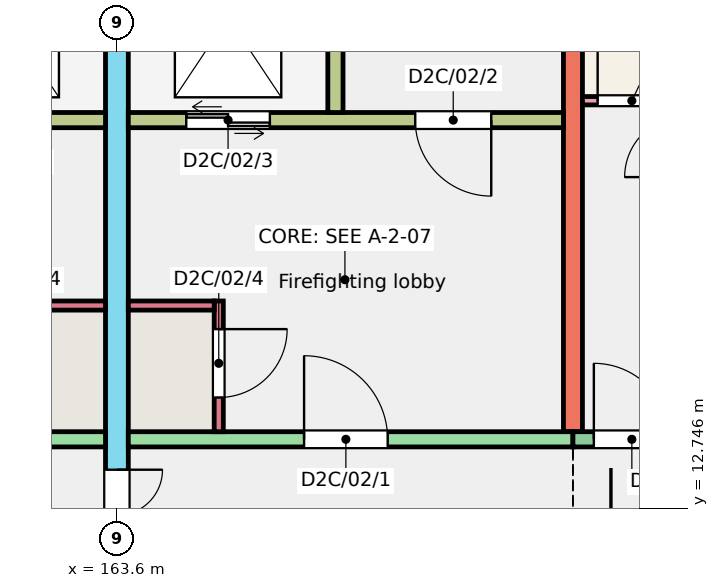
"""IFC4 building model, lengths in metres.
Left out: names, types, materials, properties, quantities, classifications, styles, units other than length and angle.
Written with IfcOpenShell. Run it as: python <this file> out.ifc"""

import sys

from ifc_helpers import new_model, si_unit, direction, frame, frame_2d, origin, place, context, subcontext, project, spatial, rectangle, extrude, element, fill, save


model = new_model("IFC4")
c1 = context("Model", 3, precision=1e-05, world=origin(), true_north=direction((0.0, 1.0)))
c2 = subcontext(c1, "Body", "Model", "MODEL_VIEW")
j1 = project(units=[si_unit("LENGTHUNIT", "METRE"), si_unit("PLANEANGLEUNIT", "RADIAN")], contexts=[c1])
p1 = place(None, origin())
s1 = spatial("IfcSite", under=j1, at=p1, CompositionType="ELEMENT")
p2 = place(p1, origin())
s2 = spatial("IfcBuilding", under=s1, at=p2, CompositionType="ELEMENT")
p3 = place(p2, frame((0.0, 0.0, 6.0)))
s3 = spatial("IfcBuildingStorey", under=s2, at=p3, CompositionType="ELEMENT", Elevation=6.0)
p4 = place(p3, frame((163.6, 11.75, 0.0), z_axis=(0.0, 0.0, 1.0), x_axis=(0.0, 1.0, 0.0)))
e1 = element("IfcWall", 1, at=p4, inside=s3, PredefinedType="SHEAR", context=c2, shape_type="SweptSolid", body=[
    extrude(rectangle(XDim=11.0, YDim=0.3, at=frame_2d((5.5, 0.0))), origin(), (0.0, 0.0, 1.0), 3.0),
])
p5 = place(p4, frame((0.3, 0.0, 0.0)))
e2 = element("IfcOpeningElement", 2, at=p5, cuts=e1, PredefinedType="OPENING", context=c2, shape_type="SweptSolid", body=[
    extrude(rectangle(XDim=1.2, YDim=2.1, at=frame_2d((0.6, 1.05))), frame((0.0, 0.16, 0.0), z_axis=(0.0, -1.0, 0.0), x_axis=(1.0, 0.0, 0.0)), (0.0, 0.0, 1.0), 0.32),
])
p6 = place(p3, frame((169.6, 13.75, 0.0), z_axis=(0.0, 0.0, 1.0), x_axis=(0.0, 1.0, 0.0)))
e3 = element("IfcWall", 3, at=p6, inside=s3, PredefinedType="SHEAR", context=c2, shape_type="SweptSolid", body=[
    extrude(rectangle(XDim=9.0, YDim=0.25, at=frame_2d((4.5, 0.0))), origin(), (0.0, 0.0, 1.0), 3.0),
])
p7 = place(p3, frame((157.6, 13.65, 0.0), z_axis=(0.0, 0.0, 1.0), x_axis=(1.0, 0.0, 0.0)))
e4 = element("IfcWall", 4, at=p7, inside=s3, PredefinedType="SHEAR", context=c2, shape_type="SweptSolid", body=[
    extrude(rectangle(XDim=5.85, YDim=0.2, at=frame_2d((2.925, 0.0))), origin(), (0.0, 0.0, 1.0), 3.0),
])
p8 = place(p7, frame((2.438, 0.0, 0.0)))
e5 = element("IfcOpeningElement", 5, at=p8, cuts=e4, PredefinedType="OPENING", context=c2, shape_type="SweptSolid", body=[
    extrude(rectangle(XDim=1.1, YDim=2.1, at=frame_2d((0.55, 1.05))), frame((0.0, 0.11, 0.0), z_axis=(0.0, -1.0, 0.0), x_axis=(1.0, 0.0, 0.0)), (0.0, 0.0, 1.0), 0.22),
])
p9 = place(p3, frame((157.725, 17.85, 0.0), z_axis=(0.0, 0.0, 1.0), x_axis=(1.0, 0.0, 0.0)))
e6 = element("IfcWall", 6, at=p9, inside=s3, PredefinedType="SHEAR", context=c2, shape_type="SweptSolid", body=[
    extrude(rectangle(XDim=5.725, YDim=0.2, at=frame_2d((2.862, 0.0))), origin(), (0.0, 0.0, 1.0), 3.0),
])
p10 = place(p9, frame((0.95, 0.0, 0.0)))
e7 = element("IfcOpeningElement", 7, at=p10, cuts=e6, PredefinedType="OPENING", context=c2, shape_type="SweptSolid", body=[
    extrude(rectangle(XDim=1.0, YDim=2.1, at=frame_2d((0.5, 1.05))), frame((0.0, 0.11, 0.0), z_axis=(0.0, -1.0, 0.0), x_axis=(1.0, 0.0, 0.0)), (0.0, 0.0, 1.0), 0.22),
])
p11 = place(p9, frame((3.863, 0.0, 0.0)))
e8 = element("IfcOpeningElement", 8, at=p11, cuts=e6, PredefinedType="OPENING", context=c2, shape_type="SweptSolid", body=[
    extrude(rectangle(XDim=1.1, YDim=2.1, at=frame_2d((0.55, 1.05))), frame((0.0, 0.11, 0.0), z_axis=(0.0, -1.0, 0.0), x_axis=(1.0, 0.0, 0.0)), (0.0, 0.0, 1.0), 0.22),
])
p12 = place(p3, frame((162.32, 15.41, 0.0), z_axis=(0.0, 0.0, 1.0), x_axis=(1.0, 0.0, 0.0)))
e9 = element("IfcWall", 9, at=p12, inside=s3, PredefinedType="SHEAR", context=c2, shape_type="SweptSolid", body=[
    extrude(rectangle(XDim=1.13, YDim=0.12, at=frame_2d((0.565, 0.0))), origin(), (0.0, 0.0, 1.0), 3.0),
])
p13 = place(p3, frame((163.75, 13.65, 0.0), z_axis=(0.0, 0.0, 1.0), x_axis=(1.0, 0.0, 0.0)))
e10 = element("IfcWall", 10, at=p13, inside=s3, PredefinedType="SHEAR", context=c2, shape_type="SweptSolid", body=[
    extrude(rectangle(XDim=5.85, YDim=0.2, at=frame_2d((2.925, 0.0))), origin(), (0.0, 0.0, 1.0), 3.0),
])
p14 = place(p13, frame((2.312, 0.0, 0.0)))
e11 = element("IfcOpeningElement", 11, at=p14, cuts=e10, PredefinedType="OPENING", context=c2, shape_type="SweptSolid", body=[
    extrude(rectangle(XDim=1.1, YDim=2.1, at=frame_2d((0.55, 1.05))), frame((0.0, 0.11, 0.0), z_axis=(0.0, -1.0, 0.0), x_axis=(1.0, 0.0, 0.0)), (0.0, 0.0, 1.0), 0.22),
])
p15 = place(p3, frame((163.75, 17.85, 0.0), z_axis=(0.0, 0.0, 1.0), x_axis=(1.0, 0.0, 0.0)))
e12 = element("IfcWall", 12, at=p15, inside=s3, PredefinedType="SHEAR", context=c2, shape_type="SweptSolid", body=[
    extrude(rectangle(XDim=5.725, YDim=0.2, at=frame_2d((2.863, 0.0))), origin(), (0.0, 0.0, 1.0), 3.0),
])
p16 = place(p15, frame((3.775, 0.0, 0.0)))
e13 = element("IfcOpeningElement", 13, at=p16, cuts=e12, PredefinedType="OPENING", context=c2, shape_type="SweptSolid", body=[
    extrude(rectangle(XDim=1.0, YDim=2.1, at=frame_2d((0.5, 1.05))), frame((0.0, 0.11, 0.0), z_axis=(0.0, -1.0, 0.0), x_axis=(1.0, 0.0, 0.0)), (0.0, 0.0, 1.0), 0.22),
])
p17 = place(p15, frame((0.762, 0.0, 0.0)))
e14 = element("IfcOpeningElement", 14, at=p17, cuts=e12, PredefinedType="OPENING", context=c2, shape_type="SweptSolid", body=[
    extrude(rectangle(XDim=1.1, YDim=2.1, at=frame_2d((0.55, 1.05))), frame((0.0, 0.11, 0.0), z_axis=(0.0, -1.0, 0.0), x_axis=(1.0, 0.0, 0.0)), (0.0, 0.0, 1.0), 0.22),
])
p18 = place(p3, frame((166.475, 17.95, 0.0), z_axis=(0.0, 0.0, 1.0), x_axis=(0.0, 1.0, 0.0)))
e15 = element("IfcWall", 15, at=p18, inside=s3, PredefinedType="SHEAR", context=c2, shape_type="SweptSolid", body=[
    extrude(rectangle(XDim=4.8, YDim=0.2, at=frame_2d((2.4, 0.0))), origin(), (0.0, 0.0, 1.0), 3.0),
])
p19 = place(p3, frame((164.94, 13.75, 0.0), z_axis=(0.0, 0.0, 1.0), x_axis=(0.0, 1.0, 0.0)))
e16 = element("IfcWall", 16, at=p19, inside=s3, PredefinedType="SHEAR", context=c2, shape_type="SweptSolid", body=[
    extrude(rectangle(XDim=1.72, YDim=0.12, at=frame_2d((0.86, 0.0))), origin(), (0.0, 0.0, 1.0), 3.0),
])
p20 = place(p19, frame((0.45, 0.0, 0.0)))
e17 = element("IfcOpeningElement", 17, at=p20, cuts=e16, PredefinedType="OPENING", context=c2, shape_type="SweptSolid", body=[
    extrude(rectangle(XDim=0.9, YDim=2.1, at=frame_2d((0.45, 1.05))), frame((0.0, 0.07, 0.0), z_axis=(0.0, -1.0, 0.0), x_axis=(1.0, 0.0, 0.0)), (0.0, 0.0, 1.0), 0.14),
])
p21 = place(p3, frame((163.75, 15.41, 0.0), z_axis=(0.0, 0.0, 1.0), x_axis=(1.0, 0.0, 0.0)))
e18 = element("IfcWall", 18, at=p21, inside=s3, PredefinedType="SHEAR", context=c2, shape_type="SweptSolid", body=[
    extrude(rectangle(XDim=1.13, YDim=0.12, at=frame_2d((0.565, 0.0))), origin(), (0.0, 0.0, 1.0), 3.0),
])
p22 = place(p3, frame((169.6, 13.65, 0.0), z_axis=(0.0, 0.0, 1.0), x_axis=(1.0, 0.0, 0.0)))
e19 = element("IfcWall", 19, at=p22, inside=s3, PredefinedType="SOLIDWALL", context=c2, shape_type="SweptSolid", body=[
    extrude(rectangle(XDim=3.6, YDim=0.2, at=frame_2d((1.8, 0.0))), origin(), (0.0, 0.0, 1.0), 3.0),
])
p23 = place(p22, frame((1.905, 0.0, 1.1)))
e20 = element("IfcOpeningElement", 20, at=p23, cuts=e19, PredefinedType="OPENING", context=c2, shape_type="SweptSolid", body=[
    extrude(rectangle(XDim=1.2, YDim=1.3, at=frame_2d((0.6, 0.65))), frame((0.0, 0.11, 0.0), z_axis=(0.0, -1.0, 0.0), x_axis=(1.0, 0.0, 0.0)), (0.0, 0.0, 1.0), 0.22),
])
p24 = place(p22, frame((0.275, 0.0, 0.0)))
e21 = element("IfcOpeningElement", 21, at=p24, cuts=e19, PredefinedType="OPENING", context=c2, shape_type="SweptSolid", body=[
    extrude(rectangle(XDim=1.0, YDim=2.1, at=frame_2d((0.5, 1.05))), frame((0.0, 0.11, 0.0), z_axis=(0.0, -1.0, 0.0), x_axis=(1.0, 0.0, 0.0)), (0.0, 0.0, 1.0), 0.22),
])
p25 = place(p3, frame((169.725, 18.105, 0.0), z_axis=(0.0, 0.0, 1.0), x_axis=(1.0, 0.0, 0.0)))
e22 = element("IfcWall", 22, at=p25, inside=s3, PredefinedType="PARTITIONING", context=c2, shape_type="SweptSolid", body=[
    extrude(rectangle(XDim=3.35, YDim=0.11, at=frame_2d((1.675, 0.0))), origin(), (0.0, 0.0, 1.0), 2.8),
])
p26 = place(p25, frame((0.2, 0.0, 0.0)))
e23 = element("IfcOpeningElement", 23, at=p26, cuts=e22, PredefinedType="OPENING", context=c2, shape_type="SweptSolid", body=[
    extrude(rectangle(XDim=0.9, YDim=2.1, at=frame_2d((0.45, 1.05))), frame((0.0, 0.065, 0.0), z_axis=(0.0, -1.0, 0.0), x_axis=(1.0, 0.0, 0.0)), (0.0, 0.0, 1.0), 0.13),
])
p27 = place(p24, origin())
e24 = element("IfcDoor", 24, at=p27, inside=s3, OperationType="SINGLE_SWING_LEFT", PredefinedType="DOOR", context=c2, shape_type="SweptSolid", body=[
    extrude(rectangle(XDim=1.0, YDim=2.1, at=frame_2d((0.5, 1.05))), frame((0.0, 0.025, 0.0), z_axis=(0.0, -1.0, 0.0), x_axis=(1.0, 0.0, 0.0)), (0.0, 0.0, 1.0), 0.05),
])
fill(e21, e24)
p28 = place(p26, origin())
e25 = element("IfcDoor", 25, at=p28, inside=s3, OperationType="SINGLE_SWING_LEFT", PredefinedType="DOOR", context=c2, shape_type="SweptSolid", body=[
    extrude(rectangle(XDim=0.9, YDim=2.1, at=frame_2d((0.45, 1.05))), frame((0.0, 0.025, 0.0), z_axis=(0.0, -1.0, 0.0), x_axis=(1.0, 0.0, 0.0)), (0.0, 0.0, 1.0), 0.05),
])
fill(e23, e25)
p29 = place(p14, origin())
e26 = element("IfcDoor", 26, at=p29, inside=s3, OperationType="SINGLE_SWING_LEFT", PredefinedType="DOOR", context=c2, shape_type="SweptSolid", body=[
    extrude(rectangle(XDim=1.1, YDim=2.1, at=frame_2d((0.55, 1.05))), frame((0.0, 0.025, 0.0), z_axis=(0.0, -1.0, 0.0), x_axis=(1.0, 0.0, 0.0)), (0.0, 0.0, 1.0), 0.05),
])
fill(e11, e26)
p30 = place(p16, origin())
e27 = element("IfcDoor", 27, at=p30, inside=s3, OperationType="SINGLE_SWING_RIGHT", PredefinedType="DOOR", context=c2, shape_type="SweptSolid", body=[
    extrude(rectangle(XDim=1.0, YDim=2.1, at=frame_2d((0.5, 1.05))), frame((0.0, 0.025, 0.0), z_axis=(0.0, -1.0, 0.0), x_axis=(1.0, 0.0, 0.0)), (0.0, 0.0, 1.0), 0.05),
])
fill(e13, e27)
p31 = place(p17, origin())
e28 = element("IfcDoor", 28, at=p31, inside=s3, OperationType="DOUBLE_DOOR_SLIDING", PredefinedType="DOOR", context=c2, shape_type="SweptSolid", body=[
    extrude(rectangle(XDim=1.1, YDim=2.1, at=frame_2d((0.55, 1.05))), frame((0.0, 0.025, 0.0), z_axis=(0.0, -1.0, 0.0), x_axis=(1.0, 0.0, 0.0)), (0.0, 0.0, 1.0), 0.05),
])
fill(e14, e28)
p32 = place(p20, origin())
e29 = element("IfcDoor", 29, at=p32, inside=s3, OperationType="SINGLE_SWING_RIGHT", PredefinedType="DOOR", context=c2, shape_type="SweptSolid", body=[
    extrude(rectangle(XDim=0.9, YDim=2.1, at=frame_2d((0.45, 1.05))), frame((0.0, 0.025, 0.0), z_axis=(0.0, -1.0, 0.0), x_axis=(1.0, 0.0, 0.0)), (0.0, 0.0, 1.0), 0.05),
])
fill(e17, e29)
p33 = place(p5, origin())
e30 = element("IfcDoor", 30, at=p33, inside=s3, OperationType="DOUBLE_DOOR_SINGLE_SWING", PredefinedType="DOOR", context=c2, shape_type="SweptSolid", body=[
    extrude(rectangle(XDim=1.2, YDim=2.1, at=frame_2d((0.6, 1.05))), frame((0.0, 0.025, 0.0), z_axis=(0.0, -1.0, 0.0), x_axis=(1.0, 0.0, 0.0)), (0.0, 0.0, 1.0), 0.05),
])
fill(e2, e30)
save(model, sys.argv[1])
